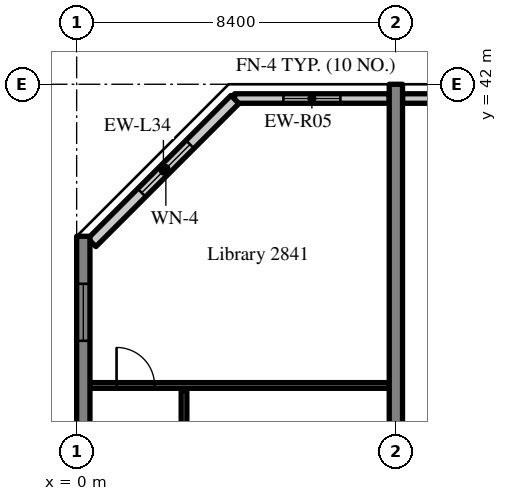
"""IFC4 building model, lengths in metres.
Left out: names, types, materials, properties, quantities, classifications, styles, units other than length and angle.
Written with IfcOpenShell. Run it as: python <this file> out.ifc"""

import sys

from ifc_helpers import new_model, si_unit, direction, frame, frame_2d, origin, place, context, subcontext, project, spatial, rectangle, extrude, source, transform, mapped, element, fill, save


model = new_model("IFC4")
c1 = context("Model", 3, precision=1e-05, world=origin(), true_north=direction((0.0, 1.0)))
c2 = subcontext(c1, "Body", "Model", "MODEL_VIEW")
j1 = project(units=[si_unit("LENGTHUNIT", "METRE"), si_unit("PLANEANGLEUNIT", "RADIAN")], contexts=[c1])
p1 = place(None, origin())
s1 = spatial("IfcSite", under=j1, at=p1, CompositionType="ELEMENT")
p2 = place(p1, origin())
s2 = spatial("IfcBuilding", under=s1, at=p2, CompositionType="ELEMENT")
p3 = place(p2, frame((0.0, 0.0, 118.0)))
s3 = spatial("IfcBuildingStorey", under=s2, at=p3, CompositionType="ELEMENT", Elevation=118.0)
m1 = source(origin(), c2, "Body", "SweptSolid", [
    extrude(rectangle(XDim=16.0, YDim=0.35, at=frame_2d((8.0, 0.0))), origin(), (0.0, 0.0, 1.0), 3.52),
])
p4 = place(p3, frame((0.175, 22.0, 0.0), z_axis=(0.0, 0.0, 1.0), x_axis=(0.0, 1.0, 0.0)))
e1 = element("IfcWall", 1, at=p4, inside=s3, PredefinedType="SHEAR", context=c2, shape_type="MappedRepresentation", body=[
    mapped(m1, transform((0.0, 0.0, 0.0), scale=1.0)),
])
m2 = source(origin(), c2, "Body", "SweptSolid", [
    extrude(rectangle(XDim=1.5, YDim=1.5, at=frame_2d((0.75, 0.75))), frame((0.0, 0.185, 0.0), z_axis=(0.0, -1.0, 0.0), x_axis=(1.0, 0.0, 0.0)), (0.0, 0.0, 1.0), 0.37),
])
p5 = place(p4, frame((1.25, 0.0, 0.9)))
e2 = element("IfcOpeningElement", 2, at=p5, cuts=e1, PredefinedType="OPENING", context=c2, shape_type="MappedRepresentation", body=[
    mapped(m2, transform((0.0, 0.0, 0.0), scale=1.0)),
])
p6 = place(p4, frame((5.25, 0.0, 0.9)))
e3 = element("IfcOpeningElement", 3, at=p6, cuts=e1, PredefinedType="OPENING", context=c2, shape_type="MappedRepresentation", body=[
    mapped(m2, transform((0.0, 0.0, 0.0), scale=1.0)),
])
p7 = place(p4, frame((9.25, 0.0, 0.9)))
e4 = element("IfcOpeningElement", 4, at=p7, cuts=e1, PredefinedType="OPENING", context=c2, shape_type="MappedRepresentation", body=[
    mapped(m2, transform((0.0, 0.0, 0.0), scale=1.0)),
])
p8 = place(p4, frame((13.25, 0.0, 0.9)))
e5 = element("IfcOpeningElement", 5, at=p8, cuts=e1, PredefinedType="OPENING", context=c2, shape_type="MappedRepresentation", body=[
    mapped(m2, transform((0.0, 0.0, 0.0), scale=1.0)),
])
m3 = source(origin(), c2, "Body", "SweptSolid", [
    extrude(rectangle(XDim=20.0, YDim=0.35, at=frame_2d((10.0, 0.0))), origin(), (0.0, 0.0, 1.0), 3.52),
])
p9 = place(p3, frame((8.4, 22.0, 0.0), z_axis=(0.0, 0.0, 1.0), x_axis=(0.0, 1.0, 0.0)))
e6 = element("IfcWall", 6, at=p9, inside=s3, PredefinedType="SHEAR", context=c2, shape_type="MappedRepresentation", body=[
    mapped(m3, transform((0.0, 0.0, 0.0), scale=1.0)),
])
m4 = source(origin(), c2, "Body", "SweptSolid", [
    extrude(rectangle(XDim=4.07, YDim=0.25, at=frame_2d((2.035, 0.0))), origin(), (0.0, 0.0, 1.0), 2.82),
])
p10 = place(p3, frame((8.225, 41.625, 0.0), z_axis=(0.0, 0.0, 1.0), x_axis=(-1.0, 0.0, 0.0)))
e7 = element("IfcWall", 7, at=p10, inside=s3, PredefinedType="SOLIDWALL", context=c2, shape_type="MappedRepresentation", body=[
    mapped(m4, transform((0.0, 0.0, 0.0), scale=1.0)),
])
m5 = source(origin(), c2, "Body", "SweptSolid", [
    extrude(rectangle(XDim=1.5, YDim=1.5, at=frame_2d((0.75, 0.75))), frame((0.0, 0.135, 0.0), z_axis=(0.0, -1.0, 0.0), x_axis=(1.0, 0.0, 0.0)), (0.0, 0.0, 1.0), 0.27),
])
p11 = place(p10, frame((1.285, 0.0, 0.9)))
e8 = element("IfcOpeningElement", 8, at=p11, cuts=e7, PredefinedType="OPENING", context=c2, shape_type="MappedRepresentation", body=[
    mapped(m5, transform((0.0, 0.0, 0.0), scale=1.0)),
])
m6 = source(origin(), c2, "Body", "SweptSolid", [
    extrude(rectangle(XDim=3.675, YDim=0.25, at=frame_2d((1.837, 0.0))), origin(), (0.0, 0.0, 1.0), 2.82),
])
p12 = place(p3, frame((12.25, 41.625, 0.0), z_axis=(0.0, 0.0, 1.0), x_axis=(-1.0, 0.0, 0.0)))
e9 = element("IfcWall", 9, at=p12, inside=s3, PredefinedType="SOLIDWALL", context=c2, shape_type="MappedRepresentation", body=[
    mapped(m6, transform((0.0, 0.0, 0.0), scale=1.0)),
])
p13 = place(p12, frame((1.087, 0.0, 0.9)))
e10 = element("IfcOpeningElement", 10, at=p13, cuts=e9, PredefinedType="OPENING", context=c2, shape_type="MappedRepresentation", body=[
    mapped(m5, transform((0.0, 0.0, 0.0), scale=1.0)),
])
m7 = source(origin(), c2, "Body", "SweptSolid", [
    extrude(rectangle(XDim=5.326, YDim=0.3, at=frame_2d((2.663, 0.0))), origin(), (0.0, 0.0, 1.0), 3.52),
])
p14 = place(p3, frame((4.166, 41.6, 0.0), z_axis=(0.0, 0.0, 1.0), x_axis=(-0.707106781187, -0.707106781187, 0.0)))
e11 = element("IfcWall", 11, at=p14, inside=s3, PredefinedType="SOLIDWALL", context=c2, shape_type="MappedRepresentation", body=[
    mapped(m7, transform((0.0, 0.0, 0.0), scale=1.0)),
])
m8 = source(origin(), c2, "Body", "SweptSolid", [
    extrude(rectangle(XDim=1.8, YDim=1.5, at=frame_2d((0.9, 0.75))), frame((0.0, 0.16, 0.0), z_axis=(0.0, -1.0, 0.0), x_axis=(1.0, 0.0, 0.0)), (0.0, 0.0, 1.0), 0.32),
])
p15 = place(p14, frame((1.672, 0.0, 0.9)))
e12 = element("IfcOpeningElement", 12, at=p15, cuts=e11, PredefinedType="OPENING", context=c2, shape_type="MappedRepresentation", body=[
    mapped(m8, transform((0.0, 0.0, 0.0), scale=1.0)),
])
m9 = source(origin(), c2, "Body", "SweptSolid", [
    extrude(rectangle(XDim=3.85, YDim=0.15, at=frame_2d((1.925, 0.0))), origin(), (0.0, 0.0, 1.0), 3.52),
])
p16 = place(p3, frame((2.825, 30.075, 0.0), z_axis=(0.0, 0.0, 1.0), x_axis=(0.0, 1.0, 0.0)))
e13 = element("IfcWall", 13, at=p16, inside=s3, PredefinedType="PARTITIONING", context=c2, shape_type="MappedRepresentation", body=[
    mapped(m9, transform((0.0, 0.0, 0.0), scale=1.0)),
])
m10 = source(origin(), c2, "Body", "SweptSolid", [
    extrude(rectangle(XDim=1.0, YDim=2.1, at=frame_2d((0.5, 1.05))), frame((0.0, 0.085, 0.0), z_axis=(0.0, -1.0, 0.0), x_axis=(1.0, 0.0, 0.0)), (0.0, 0.0, 1.0), 0.17),
])
p17 = place(p16, frame((1.425, 0.0, 0.0)))
e14 = element("IfcOpeningElement", 14, at=p17, cuts=e13, PredefinedType="OPENING", context=c2, shape_type="MappedRepresentation", body=[
    mapped(m10, transform((0.0, 0.0, 0.0), scale=1.0)),
])
m11 = source(origin(), c2, "Body", "SweptSolid", [
    extrude(rectangle(XDim=7.875, YDim=0.15, at=frame_2d((3.938, 0.0))), origin(), (0.0, 0.0, 1.0), 3.52),
])
p18 = place(p3, frame((0.35, 34.075, 0.0), z_axis=(0.0, 0.0, 1.0), x_axis=(1.0, 0.0, 0.0)))
e15 = element("IfcWall", 15, at=p18, inside=s3, PredefinedType="PARTITIONING", context=c2, shape_type="MappedRepresentation", body=[
    mapped(m11, transform((0.0, 0.0, 0.0), scale=1.0)),
])
p19 = place(p18, frame((0.7, 0.0, 0.0)))
e16 = element("IfcOpeningElement", 16, at=p19, cuts=e15, PredefinedType="OPENING", context=c2, shape_type="MappedRepresentation", body=[
    mapped(m10, transform((0.0, 0.0, 0.0), scale=1.0)),
])
m12 = source(origin(), c2, "Body", "SweptSolid", [
    extrude(rectangle(XDim=1.5, YDim=1.5, at=frame_2d((0.75, 0.75))), frame((0.0, 0.03, 0.0), z_axis=(0.0, -1.0, 0.0), x_axis=(1.0, 0.0, 0.0)), (0.0, 0.0, 1.0), 0.06),
])
p20 = place(p11, origin())
e17 = element("IfcWindow", 17, at=p20, inside=s3, PartitioningType="SINGLE_PANEL", PredefinedType="WINDOW", context=c2, shape_type="MappedRepresentation", body=[
    mapped(m12, transform((0.0, 0.0, 0.0), scale=1.0)),
])
fill(e8, e17)
m13 = source(origin(), c2, "Body", "SweptSolid", [
    extrude(rectangle(XDim=1.8, YDim=1.5, at=frame_2d((0.9, 0.75))), frame((0.0, 0.03, 0.0), z_axis=(0.0, -1.0, 0.0), x_axis=(1.0, 0.0, 0.0)), (0.0, 0.0, 1.0), 0.06),
])
p21 = place(p15, origin())
e18 = element("IfcWindow", 18, at=p21, inside=s3, PartitioningType="SINGLE_PANEL", PredefinedType="WINDOW", context=c2, shape_type="MappedRepresentation", body=[
    mapped(m13, transform((0.0, 0.0, 0.0), scale=1.0)),
])
fill(e12, e18)
p22 = place(p8, origin())
e19 = element("IfcWindow", 19, at=p22, inside=s3, PartitioningType="SINGLE_PANEL", PredefinedType="WINDOW", context=c2, shape_type="MappedRepresentation", body=[
    mapped(m12, transform((0.0, 0.0, 0.0), scale=1.0)),
])
fill(e5, e19)
m14 = source(origin(), c2, "Body", "SweptSolid", [
    extrude(rectangle(XDim=1.0, YDim=2.1, at=frame_2d((0.5, 1.05))), frame((0.0, 0.025, 0.0), z_axis=(0.0, -1.0, 0.0), x_axis=(1.0, 0.0, 0.0)), (0.0, 0.0, 1.0), 0.05),
])
p23 = place(p19, origin())
e20 = element("IfcDoor", 20, at=p23, inside=s3, OperationType="SINGLE_SWING_LEFT", PredefinedType="DOOR", context=c2, shape_type="MappedRepresentation", body=[
    mapped(m14, transform((0.0, 0.0, 0.0), scale=1.0)),
])
fill(e16, e20)
save(model, sys.argv[1])
